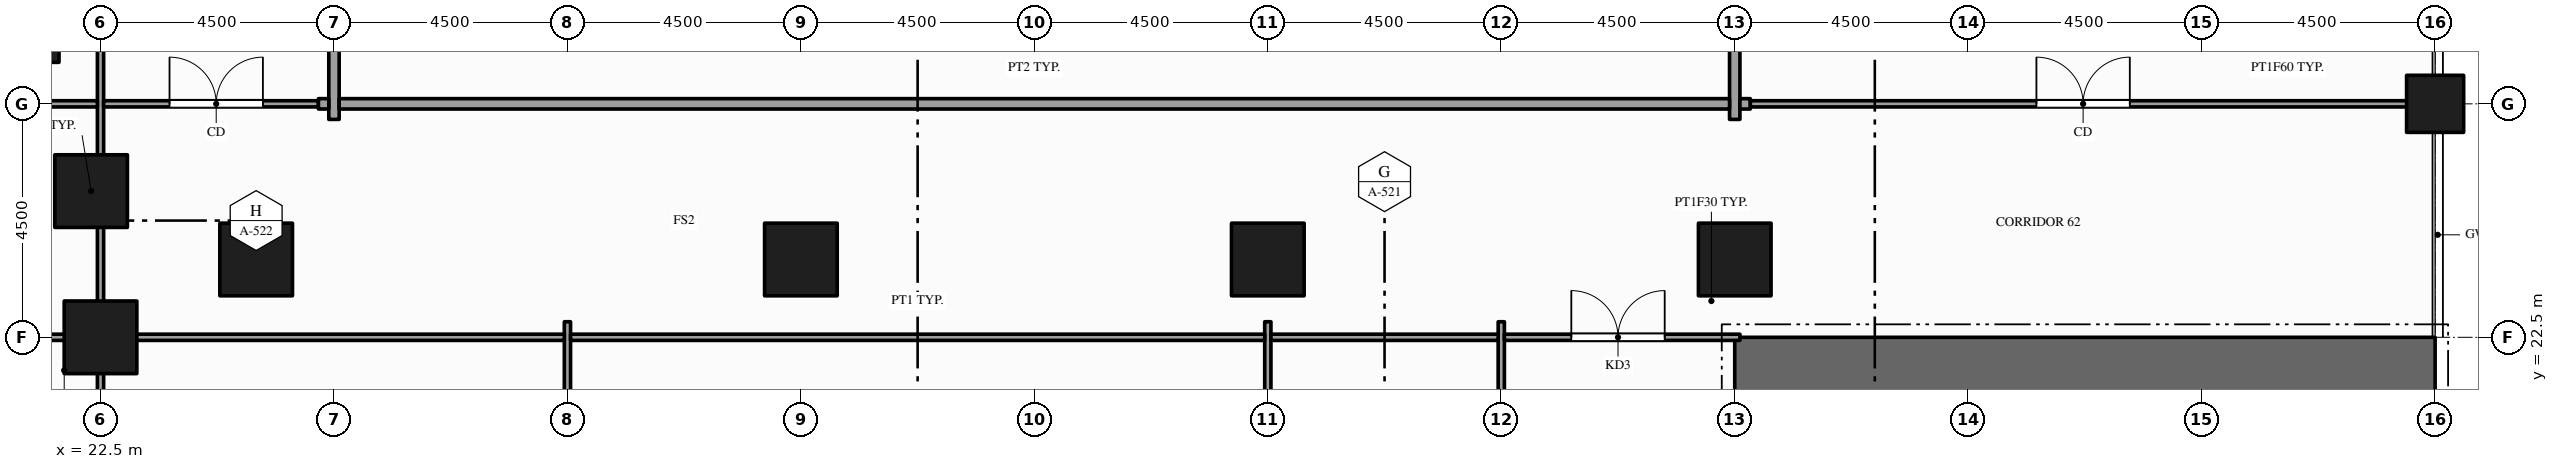
"""IFC4 building model, lengths in metres.
Left out: names, types, materials, properties, quantities, classifications, styles, units other than length and angle.
Written with IfcOpenShell. Run it as: python <this file> out.ifc"""

import sys

from ifc_helpers import new_model, si_unit, direction, frame, frame_2d, origin, origin_2d, place, context, subcontext, project, spatial, rectangle, hollow_rectangle, extrude, element, fill, save


model = new_model("IFC4")
c1 = context("Model", 3, precision=1e-05, world=origin(), true_north=direction((0.0, 1.0)))
c2 = subcontext(c1, "Body", "Model", "MODEL_VIEW")
j1 = project(units=[si_unit("LENGTHUNIT", "METRE"), si_unit("PLANEANGLEUNIT", "RADIAN")], contexts=[c1])
p1 = place(None, origin())
s1 = spatial("IfcSite", under=j1, at=p1, CompositionType="ELEMENT")
p2 = place(p1, origin())
s2 = spatial("IfcBuilding", under=s1, at=p2, CompositionType="ELEMENT")
p3 = place(p2, frame((0.0, 0.0, 8.0)))
s3 = spatial("IfcBuildingStorey", under=s2, at=p3, CompositionType="ELEMENT", Elevation=8.0)
p4 = place(p3, frame((54.0, 21.9, -0.15), z_axis=(0.0, 0.0, 1.0), x_axis=(1.0, 0.0, 0.0)))
e1 = element("IfcWall", 1, at=p4, inside=s3, PredefinedType="SHEAR", context=c2, shape_type="SweptSolid", body=[
    extrude(rectangle(XDim=13.5, YDim=1.2, at=frame_2d((6.75, 0.0))), origin(), (0.0, 0.0, 1.0), 6.0),
])
for number, where, z_axis, x_axis in (
    (2, (21.0, 28.5, -0.25), (0.0, 0.0, 1.0), (1.0, 0.0, 0.0)),
    (3, (22.318, 25.318, -0.25), (0.0, 0.0, 1.0), (1.0, 0.0, 0.0)),
    (4, (22.5, 22.5, -0.25), (0.0, 0.0, 1.0), (1.0, 0.0, 0.0)),
    (5, (25.5, 24.0, -0.25), (0.0, 0.0, 1.0), (1.0, 0.0, 0.0)),
    (6, (36.0, 24.0, -0.25), (0.0, 0.0, 1.0), (1.0, 0.0, 0.0)),
    (7, (45.0, 24.0, -0.25), (0.0, 0.0, 1.0), (1.0, 0.0, 0.0)),
    (8, (54.0, 24.0, -0.25), (0.0, 0.0, 1.0), (1.0, 0.0, 0.0)),
):
    element("IfcColumn", number, at=place(p3, frame(where, z_axis=z_axis, x_axis=x_axis)), inside=s3, PredefinedType="COLUMN", context=c2, shape_type="SweptSolid", body=[
        extrude(hollow_rectangle(XDim=1.4, YDim=1.4, WallThickness=0.08, at=origin_2d()), origin(), (0.0, 0.0, 1.0), 6.0),
    ])
p5 = place(p3, frame((67.5, 27.0, -0.25), z_axis=(0.0, 0.0, 1.0), x_axis=(1.0, 0.0, 0.0)))
e9 = element("IfcColumn", 9, at=p5, inside=s3, PredefinedType="COLUMN", context=c2, shape_type="SweptSolid", body=[
    extrude(hollow_rectangle(XDim=1.1, YDim=1.1, WallThickness=0.06, at=origin_2d()), origin(), (0.0, 0.0, 1.0), 6.0),
])
p6 = place(p3, frame((22.5, 0.15, 0.0), z_axis=(0.0, 0.0, 1.0), x_axis=(0.0, 1.0, 0.0)))
e10 = element("IfcWall", 10, at=p6, inside=s3, PredefinedType="PARTITIONING", context=c2, shape_type="SweptSolid", body=[
    extrude(rectangle(XDim=35.95, YDim=0.12, at=frame_2d((17.975, 0.0))), origin(), (0.0, 0.0, 1.0), 4.759),
])
p7 = place(p6, frame((9.225, 0.0, 0.0)))
e11 = element("IfcOpeningElement", 11, at=p7, cuts=e10, PredefinedType="OPENING", context=c2, shape_type="SweptSolid", body=[
    extrude(rectangle(XDim=1.5, YDim=2.1, at=frame_2d((0.75, 1.05))), frame((0.0, 0.07, 0.0), z_axis=(0.0, -1.0, 0.0), x_axis=(1.0, 0.0, 0.0)), (0.0, 0.0, 1.0), 0.14),
])
p8 = place(p6, frame((32.7, 0.0, 0.0)))
e12 = element("IfcOpeningElement", 12, at=p8, cuts=e10, PredefinedType="OPENING", context=c2, shape_type="SweptSolid", body=[
    extrude(rectangle(XDim=1.8, YDim=2.1, at=frame_2d((0.9, 1.05))), frame((0.0, 0.07, 0.0), z_axis=(0.0, -1.0, 0.0), x_axis=(1.0, 0.0, 0.0)), (0.0, 0.0, 1.0), 0.14),
])
p9 = place(p3, frame((27.0, 26.7, 0.0), z_axis=(0.0, 0.0, 1.0), x_axis=(0.0, 1.0, 0.0)))
e13 = element("IfcWall", 13, at=p9, inside=s3, PredefinedType="PARTITIONING", context=c2, shape_type="SweptSolid", body=[
    extrude(rectangle(XDim=22.65, YDim=0.2, at=frame_2d((11.325, 0.0))), origin(), (0.0, 0.0, 1.0), 4.66),
])
p10 = place(p9, frame((19.115, 0.0, 0.0)))
e14 = element("IfcOpeningElement", 14, at=p10, cuts=e13, PredefinedType="OPENING", context=c2, shape_type="SweptSolid", body=[
    extrude(rectangle(XDim=1.2, YDim=2.1, at=frame_2d((0.6, 1.05))), frame((0.0, 0.11, 0.0), z_axis=(0.0, -1.0, 0.0), x_axis=(1.0, 0.0, 0.0)), (0.0, 0.0, 1.0), 0.22),
])
p11 = place(p3, frame((31.5, 10.95, 0.0), z_axis=(0.0, 0.0, 1.0), x_axis=(0.0, 1.0, 0.0)))
e15 = element("IfcWall", 15, at=p11, inside=s3, PredefinedType="PARTITIONING", context=c2, shape_type="SweptSolid", body=[
    extrude(rectangle(XDim=11.85, YDim=0.12, at=frame_2d((5.925, 0.0))), origin(), (0.0, 0.0, 1.0), 4.759),
])
p12 = place(p3, frame((45.0, 0.15, 0.0), z_axis=(0.0, 0.0, 1.0), x_axis=(0.0, 1.0, 0.0)))
e16 = element("IfcWall", 16, at=p12, inside=s3, PredefinedType="PARTITIONING", context=c2, shape_type="SweptSolid", body=[
    extrude(rectangle(XDim=22.65, YDim=0.12, at=frame_2d((11.325, 0.0))), origin(), (0.0, 0.0, 1.0), 4.759),
])
p13 = place(p12, frame((9.225, 0.0, 0.0)))
e17 = element("IfcOpeningElement", 17, at=p13, cuts=e16, PredefinedType="OPENING", context=c2, shape_type="SweptSolid", body=[
    extrude(rectangle(XDim=1.5, YDim=2.1, at=frame_2d((0.75, 1.05))), frame((0.0, 0.07, 0.0), z_axis=(0.0, -1.0, 0.0), x_axis=(1.0, 0.0, 0.0)), (0.0, 0.0, 1.0), 0.14),
])
p14 = place(p3, frame((49.5, 0.15, 0.0), z_axis=(0.0, 0.0, 1.0), x_axis=(0.0, 1.0, 0.0)))
e18 = element("IfcWall", 18, at=p14, inside=s3, PredefinedType="PARTITIONING", context=c2, shape_type="SweptSolid", body=[
    extrude(rectangle(XDim=22.65, YDim=0.12, at=frame_2d((11.325, 0.0))), origin(), (0.0, 0.0, 1.0), 4.759),
])
p15 = place(p14, frame((0.955, 0.0, 0.0)))
e19 = element("IfcOpeningElement", 19, at=p15, cuts=e18, PredefinedType="OPENING", context=c2, shape_type="SweptSolid", body=[
    extrude(rectangle(XDim=0.9, YDim=2.1, at=frame_2d((0.45, 1.05))), frame((0.0, 0.07, 0.0), z_axis=(0.0, -1.0, 0.0), x_axis=(1.0, 0.0, 0.0)), (0.0, 0.0, 1.0), 0.14),
])
p16 = place(p14, frame((3.9, 0.0, 0.0)))
e20 = element("IfcOpeningElement", 20, at=p16, cuts=e18, PredefinedType="OPENING", context=c2, shape_type="SweptSolid", body=[
    extrude(rectangle(XDim=0.9, YDim=2.1, at=frame_2d((0.45, 1.05))), frame((0.0, 0.07, 0.0), z_axis=(0.0, -1.0, 0.0), x_axis=(1.0, 0.0, 0.0)), (0.0, 0.0, 1.0), 0.14),
])
p17 = place(p14, frame((6.85, 0.0, 0.0)))
e21 = element("IfcOpeningElement", 21, at=p17, cuts=e18, PredefinedType="OPENING", context=c2, shape_type="SweptSolid", body=[
    extrude(rectangle(XDim=1.0, YDim=2.1, at=frame_2d((0.5, 1.05))), frame((0.0, 0.07, 0.0), z_axis=(0.0, -1.0, 0.0), x_axis=(1.0, 0.0, 0.0)), (0.0, 0.0, 1.0), 0.14),
])
p18 = place(p14, frame((16.275, 0.0, 0.0)))
e22 = element("IfcOpeningElement", 22, at=p18, cuts=e18, PredefinedType="OPENING", context=c2, shape_type="SweptSolid", body=[
    extrude(rectangle(XDim=0.9, YDim=2.1, at=frame_2d((0.45, 1.05))), frame((0.0, 0.07, 0.0), z_axis=(0.0, -1.0, 0.0), x_axis=(1.0, 0.0, 0.0)), (0.0, 0.0, 1.0), 0.14),
])
p19 = place(p14, frame((9.225, 0.0, 0.0)))
e23 = element("IfcOpeningElement", 23, at=p19, cuts=e18, PredefinedType="OPENING", context=c2, shape_type="SweptSolid", body=[
    extrude(rectangle(XDim=1.5, YDim=2.1, at=frame_2d((0.75, 1.05))), frame((0.0, 0.07, 0.0), z_axis=(0.0, -1.0, 0.0), x_axis=(1.0, 0.0, 0.0)), (0.0, 0.0, 1.0), 0.14),
])
p20 = place(p3, frame((54.0, 26.7, 0.0), z_axis=(0.0, 0.0, 1.0), x_axis=(0.0, 1.0, 0.0)))
e24 = element("IfcWall", 24, at=p20, inside=s3, PredefinedType="PARTITIONING", context=c2, shape_type="SweptSolid", body=[
    extrude(rectangle(XDim=22.65, YDim=0.2, at=frame_2d((11.325, 0.0))), origin(), (0.0, 0.0, 1.0), 4.66),
])
p21 = place(p3, frame((11.31, 22.5, 0.0), z_axis=(0.0, 0.0, 1.0), x_axis=(1.0, 0.0, 0.0)))
e25 = element("IfcWall", 25, at=p21, inside=s3, PredefinedType="PARTITIONING", context=c2, shape_type="SweptSolid", body=[
    extrude(rectangle(XDim=11.13, YDim=0.12, at=frame_2d((5.565, 0.0))), origin(), (0.0, 0.0, 1.0), 4.5),
])
p22 = place(p3, frame((22.56, 22.5, 0.0), z_axis=(0.0, 0.0, 1.0), x_axis=(1.0, 0.0, 0.0)))
e26 = element("IfcWall", 26, at=p22, inside=s3, PredefinedType="PARTITIONING", context=c2, shape_type="SweptSolid", body=[
    extrude(rectangle(XDim=8.88, YDim=0.12, at=frame_2d((4.44, 0.0))), origin(), (0.0, 0.0, 1.0), 4.66),
])
p23 = place(p3, frame((31.56, 22.5, 0.0), z_axis=(0.0, 0.0, 1.0), x_axis=(1.0, 0.0, 0.0)))
e27 = element("IfcWall", 27, at=p23, inside=s3, PredefinedType="PARTITIONING", context=c2, shape_type="SweptSolid", body=[
    extrude(rectangle(XDim=13.38, YDim=0.12, at=frame_2d((6.69, 0.0))), origin(), (0.0, 0.0, 1.0), 4.66),
])
p24 = place(p3, frame((45.06, 22.5, 0.0), z_axis=(0.0, 0.0, 1.0), x_axis=(1.0, 0.0, 0.0)))
e28 = element("IfcWall", 28, at=p24, inside=s3, PredefinedType="PARTITIONING", context=c2, shape_type="SweptSolid", body=[
    extrude(rectangle(XDim=4.38, YDim=0.12, at=frame_2d((2.19, 0.0))), origin(), (0.0, 0.0, 1.0), 4.66),
])
p25 = place(p3, frame((49.56, 22.5, 0.0), z_axis=(0.0, 0.0, 1.0), x_axis=(1.0, 0.0, 0.0)))
e29 = element("IfcWall", 29, at=p25, inside=s3, PredefinedType="PARTITIONING", context=c2, shape_type="SweptSolid", body=[
    extrude(rectangle(XDim=4.54, YDim=0.12, at=frame_2d((2.27, 0.0))), origin(), (0.0, 0.0, 1.0), 4.66),
])
p26 = place(p25, frame((1.29, 0.0, 0.0)))
e30 = element("IfcOpeningElement", 30, at=p26, cuts=e29, PredefinedType="OPENING", context=c2, shape_type="SweptSolid", body=[
    extrude(rectangle(XDim=1.8, YDim=2.1, at=frame_2d((0.9, 1.05))), frame((0.0, 0.07, 0.0), z_axis=(0.0, -1.0, 0.0), x_axis=(1.0, 0.0, 0.0)), (0.0, 0.0, 1.0), 0.14),
])
p27 = place(p3, frame((11.31, 27.0, 0.0), z_axis=(0.0, 0.0, 1.0), x_axis=(1.0, 0.0, 0.0)))
e31 = element("IfcWall", 31, at=p27, inside=s3, PredefinedType="PARTITIONING", context=c2, shape_type="SweptSolid", body=[
    extrude(rectangle(XDim=11.13, YDim=0.12, at=frame_2d((5.565, 0.0))), origin(), (0.0, 0.0, 1.0), 4.5),
])
p28 = place(p3, frame((22.56, 27.0, 0.0), z_axis=(0.0, 0.0, 1.0), x_axis=(1.0, 0.0, 0.0)))
e32 = element("IfcWall", 32, at=p28, inside=s3, PredefinedType="PARTITIONING", context=c2, shape_type="SweptSolid", body=[
    extrude(rectangle(XDim=4.14, YDim=0.12, at=frame_2d((2.07, 0.0))), origin(), (0.0, 0.0, 1.0), 4.66),
])
p29 = place(p28, frame((1.27, 0.0, 0.0)))
e33 = element("IfcOpeningElement", 33, at=p29, cuts=e32, PredefinedType="OPENING", context=c2, shape_type="SweptSolid", body=[
    extrude(rectangle(XDim=1.8, YDim=2.1, at=frame_2d((0.9, 1.05))), frame((0.0, 0.07, 0.0), z_axis=(0.0, -1.0, 0.0), x_axis=(1.0, 0.0, 0.0)), (0.0, 0.0, 1.0), 0.14),
])
p30 = place(p3, frame((26.7, 27.0, 0.0), z_axis=(0.0, 0.0, 1.0), x_axis=(1.0, 0.0, 0.0)))
e34 = element("IfcWall", 34, at=p30, inside=s3, PredefinedType="PARTITIONING", context=c2, shape_type="SweptSolid", body=[
    extrude(rectangle(XDim=0.2, YDim=0.2, at=frame_2d((0.1, 0.0))), origin(), (0.0, 0.0, 1.0), 4.66),
])
p31 = place(p3, frame((27.1, 27.0, 0.0), z_axis=(0.0, 0.0, 1.0), x_axis=(1.0, 0.0, 0.0)))
e35 = element("IfcWall", 35, at=p31, inside=s3, PredefinedType="PARTITIONING", context=c2, shape_type="SweptSolid", body=[
    extrude(rectangle(XDim=26.8, YDim=0.2, at=frame_2d((13.4, 0.0))), origin(), (0.0, 0.0, 1.0), 4.66),
])
p32 = place(p3, frame((54.1, 27.0, 0.0), z_axis=(0.0, 0.0, 1.0), x_axis=(1.0, 0.0, 0.0)))
e36 = element("IfcWall", 36, at=p32, inside=s3, PredefinedType="PARTITIONING", context=c2, shape_type="SweptSolid", body=[
    extrude(rectangle(XDim=0.2, YDim=0.2, at=frame_2d((0.1, 0.0))), origin(), (0.0, 0.0, 1.0), 4.66),
])
p33 = place(p3, frame((54.3, 27.0, 0.0), z_axis=(0.0, 0.0, 1.0), x_axis=(1.0, 0.0, 0.0)))
e37 = element("IfcWall", 37, at=p33, inside=s3, PredefinedType="PARTITIONING", context=c2, shape_type="SweptSolid", body=[
    extrude(rectangle(XDim=13.05, YDim=0.12, at=frame_2d((6.525, 0.0))), origin(), (0.0, 0.0, 1.0), 4.66),
])
p34 = place(p33, frame((5.515, 0.0, 0.0)))
e38 = element("IfcOpeningElement", 38, at=p34, cuts=e37, PredefinedType="OPENING", context=c2, shape_type="SweptSolid", body=[
    extrude(rectangle(XDim=1.8, YDim=2.1, at=frame_2d((0.9, 1.05))), frame((0.0, 0.07, 0.0), z_axis=(0.0, -1.0, 0.0), x_axis=(1.0, 0.0, 0.0)), (0.0, 0.0, 1.0), 0.14),
])
p35 = place(p26, origin())
e39 = element("IfcDoor", 39, at=p35, inside=s3, OperationType="DOUBLE_DOOR_SINGLE_SWING", PredefinedType="DOOR", context=c2, shape_type="SweptSolid", body=[
    extrude(rectangle(XDim=1.8, YDim=2.1, at=frame_2d((0.9, 1.05))), frame((0.0, 0.025, 0.0), z_axis=(0.0, -1.0, 0.0), x_axis=(1.0, 0.0, 0.0)), (0.0, 0.0, 1.0), 0.05),
])
fill(e30, e39)
p36 = place(p29, origin())
e40 = element("IfcDoor", 40, at=p36, inside=s3, OperationType="DOUBLE_DOOR_SINGLE_SWING", PredefinedType="DOOR", context=c2, shape_type="SweptSolid", body=[
    extrude(rectangle(XDim=1.8, YDim=2.1, at=frame_2d((0.9, 1.05))), frame((0.0, 0.025, 0.0), z_axis=(0.0, -1.0, 0.0), x_axis=(1.0, 0.0, 0.0)), (0.0, 0.0, 1.0), 0.05),
])
fill(e33, e40)
p37 = place(p34, origin())
e41 = element("IfcDoor", 41, at=p37, inside=s3, OperationType="DOUBLE_DOOR_SINGLE_SWING", PredefinedType="DOOR", context=c2, shape_type="SweptSolid", body=[
    extrude(rectangle(XDim=1.8, YDim=2.1, at=frame_2d((0.9, 1.05))), frame((0.0, 0.025, 0.0), z_axis=(0.0, -1.0, 0.0), x_axis=(1.0, 0.0, 0.0)), (0.0, 0.0, 1.0), 0.05),
])
fill(e38, e41)
save(model, sys.argv[1])
